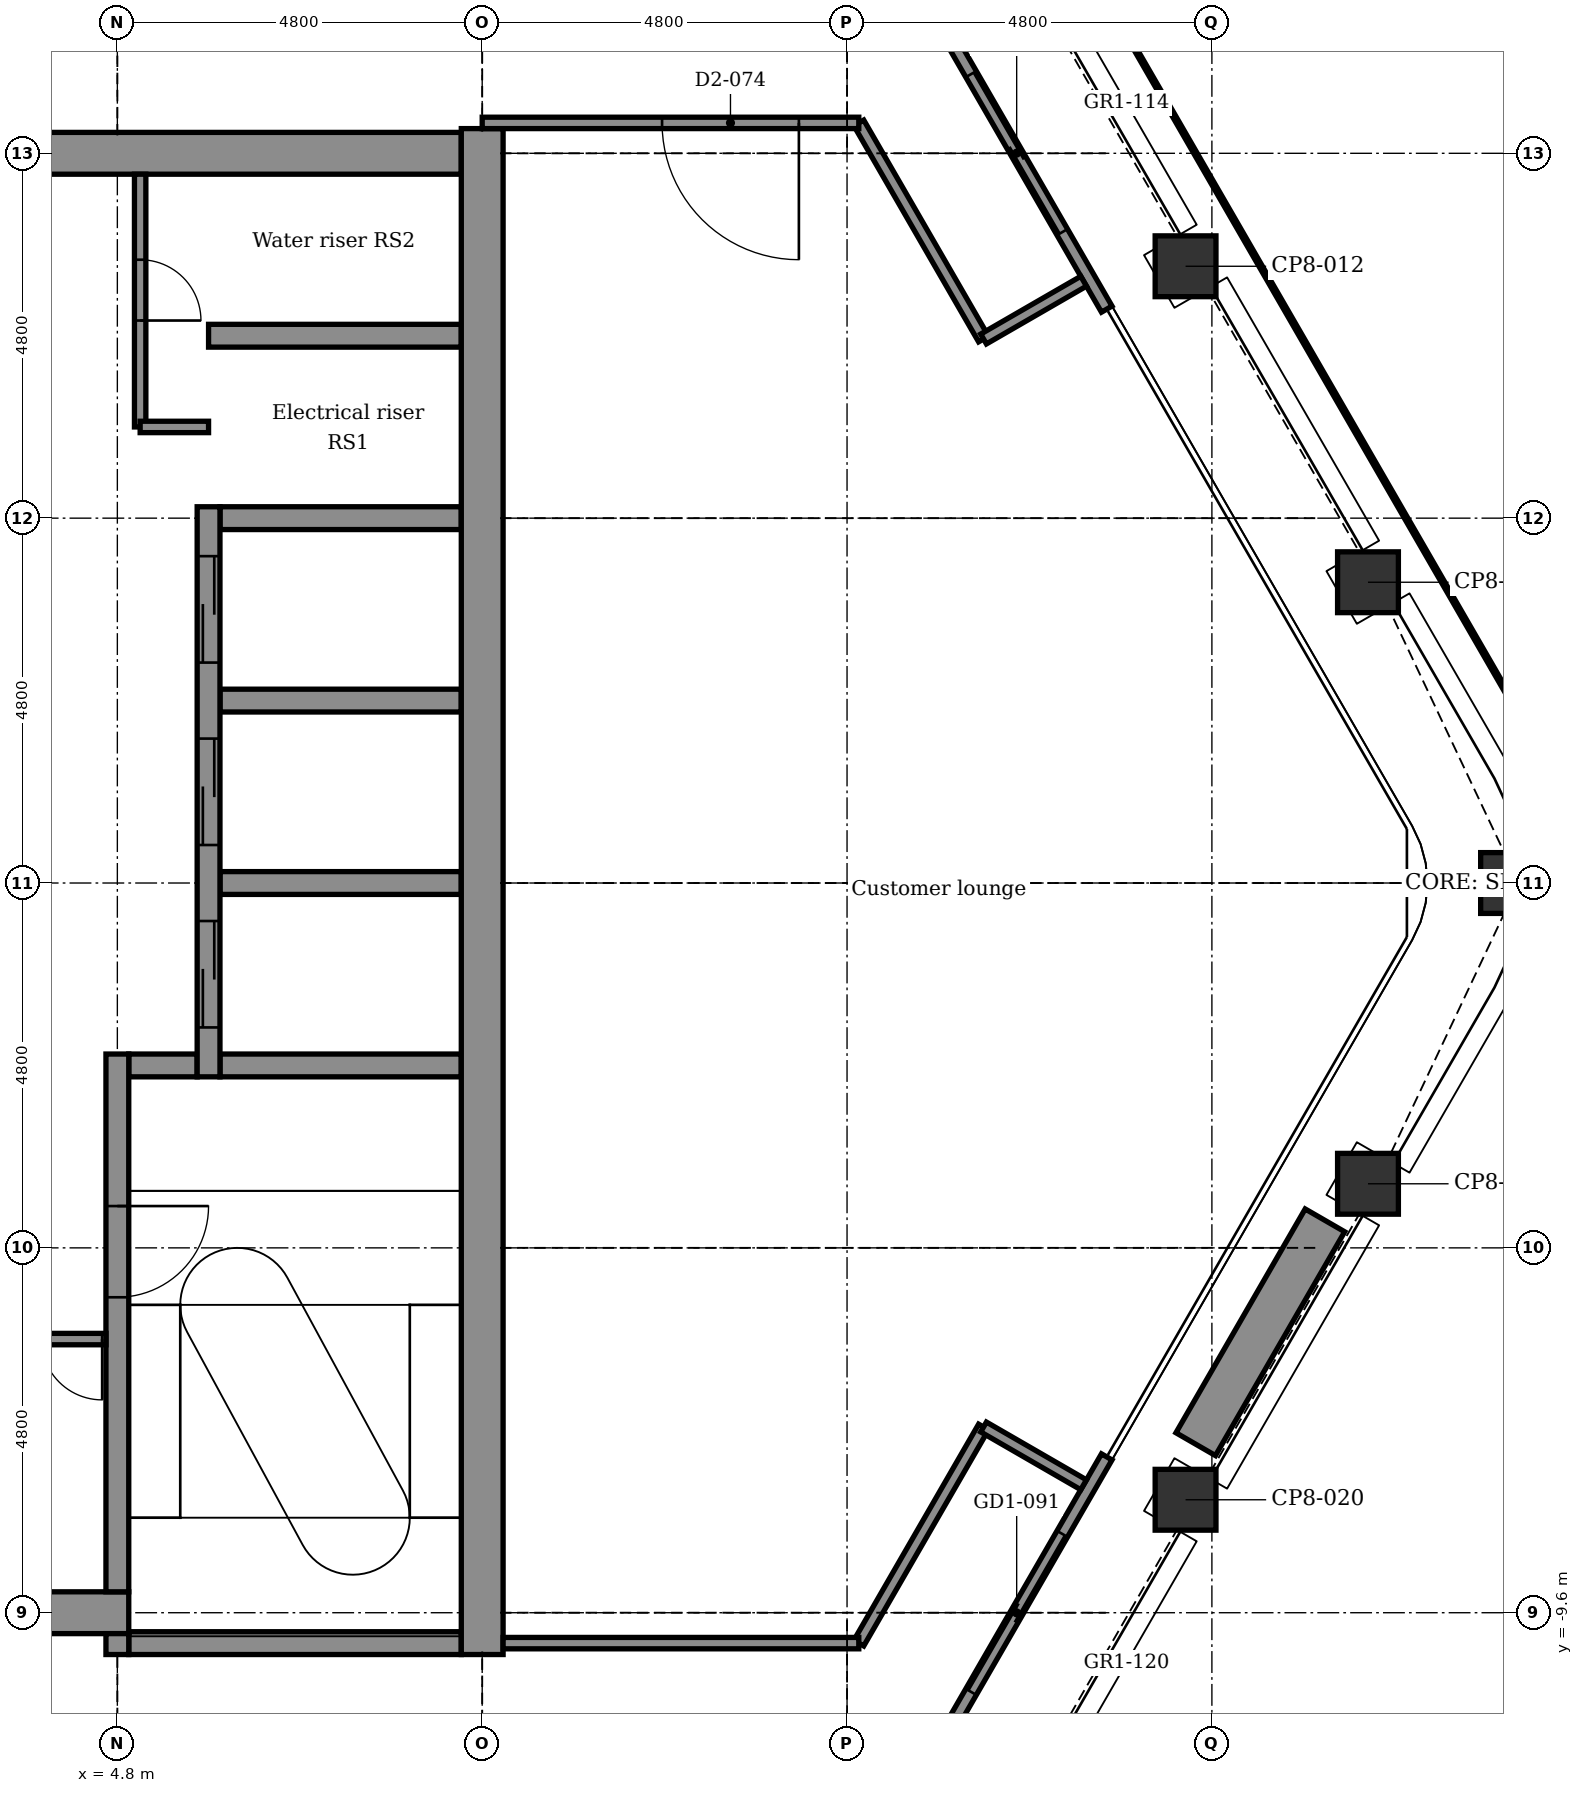
"""IFC4 building model, lengths in metres.
Left out: names, types, materials, properties, quantities, classifications, styles, units other than length and angle.
Written with IfcOpenShell. Run it as: python <this file> out.ifc"""

import sys

from ifc_helpers import new_model, si_unit, direction, frame, frame_2d, origin, origin_2d, place, context, subcontext, project, spatial, rectangle, extrude, element, fill, save


model = new_model("IFC4")
c1 = context("Model", 3, precision=1e-05, world=origin(), true_north=direction((0.0, 1.0)))
c2 = subcontext(c1, "Body", "Model", "MODEL_VIEW")
j1 = project(units=[si_unit("LENGTHUNIT", "METRE"), si_unit("PLANEANGLEUNIT", "RADIAN")], contexts=[c1])
p1 = place(None, origin())
s1 = spatial("IfcSite", under=j1, at=p1, CompositionType="ELEMENT")
p2 = place(p1, origin())
s2 = spatial("IfcBuilding", under=s1, at=p2, CompositionType="ELEMENT")
p3 = place(p2, frame((0.0, 0.0, 269.6)))
s3 = spatial("IfcBuildingStorey", under=s2, at=p3, CompositionType="ELEMENT", Elevation=269.6)
for number, where, z_axis, x_axis in (
    (1, (18.854, 8.114, -0.15), (0.0, 0.0, 1.0), (0.866, 0.5, 0.0)),
    (2, (21.254, 3.957, -0.15), (0.0, 0.0, 1.0), (0.866, 0.5, 0.0)),
    (3, (23.136, 0.0, -0.15), (0.0, 0.0, 1.0), (1.0, 0.0, 0.0)),
    (4, (21.254, -3.957, -0.15), (0.0, 0.0, 1.0), (0.5, 0.866, 0.0)),
    (5, (18.854, -8.114, -0.15), (0.0, 0.0, 1.0), (0.5, 0.866, 0.0)),
):
    element("IfcColumn", number, at=place(p3, frame(where, z_axis=z_axis, x_axis=x_axis)), inside=s3, PredefinedType="COLUMN", context=c2, shape_type="SweptSolid", body=[
        extrude(rectangle(XDim=0.8, YDim=0.8, at=origin_2d()), origin(), (0.0, 0.0, 1.0), 3.9),
    ])
p4 = place(p3, frame((4.95, -10.0, -0.15), z_axis=(0.0, 0.0, 1.0), x_axis=(1.0, 0.0, 0.0)))
e6 = element("IfcWall", 6, at=p4, inside=s3, PredefinedType="STANDARD", context=c2, shape_type="SweptSolid", body=[
    extrude(rectangle(XDim=4.375, YDim=0.3, at=frame_2d((2.188, 0.0))), origin(), (0.0, 0.0, 1.0), 3.9),
])
p5 = place(p3, frame((-5.25, -9.6, -0.15), z_axis=(0.0, 0.0, 1.0), x_axis=(1.0, 0.0, 0.0)))
e7 = element("IfcWall", 7, at=p5, inside=s3, PredefinedType="SHEAR", context=c2, shape_type="SweptSolid", body=[
    extrude(rectangle(XDim=10.2, YDim=0.55, at=frame_2d((5.1, 0.0))), origin(), (0.0, 0.0, 1.0), 3.9),
])
p6 = place(p5, frame((0.6, 0.0, 0.15)))
e8 = element("IfcOpeningElement", 8, at=p6, cuts=e7, PredefinedType="OPENING", context=c2, shape_type="SweptSolid", body=[
    extrude(rectangle(XDim=0.9, YDim=2.1, at=frame_2d((0.45, 1.05))), frame((0.0, 0.285, 0.0), z_axis=(0.0, -1.0, 0.0), x_axis=(1.0, 0.0, 0.0)), (0.0, 0.0, 1.0), 0.57),
])
p7 = place(p3, frame((4.95, -2.4, -0.15), z_axis=(0.0, 0.0, 1.0), x_axis=(1.0, 0.0, 0.0)))
e9 = element("IfcWall", 9, at=p7, inside=s3, PredefinedType="STANDARD", context=c2, shape_type="SweptSolid", body=[
    extrude(rectangle(XDim=0.9, YDim=0.3, at=frame_2d((0.45, 0.0))), origin(), (0.0, 0.0, 1.0), 3.9),
])
for number, where, z_axis, x_axis in (
    (10, (6.15, -2.4, -0.15), (0.0, 0.0, 1.0), (1.0, 0.0, 0.0)),
    (11, (6.15, 0.0, -0.15), (0.0, 0.0, 1.0), (1.0, 0.0, 0.0)),
    (12, (6.15, 2.4, -0.15), (0.0, 0.0, 1.0), (1.0, 0.0, 0.0)),
    (13, (6.15, 4.8, -0.15), (0.0, 0.0, 1.0), (1.0, 0.0, 0.0)),
):
    element("IfcWall", number, at=place(p3, frame(where, z_axis=z_axis, x_axis=x_axis)), inside=s3, PredefinedType="STANDARD", context=c2, shape_type="SweptSolid", body=[
        extrude(rectangle(XDim=3.175, YDim=0.3, at=frame_2d((1.587, 0.0))), origin(), (0.0, 0.0, 1.0), 3.9),
    ])
p8 = place(p3, frame((6.0, 7.2, -0.15), z_axis=(0.0, 0.0, 1.0), x_axis=(1.0, 0.0, 0.0)))
e14 = element("IfcWall", 14, at=p8, inside=s3, PredefinedType="STANDARD", context=c2, shape_type="SweptSolid", body=[
    extrude(rectangle(XDim=3.325, YDim=0.3, at=frame_2d((1.663, 0.0))), origin(), (0.0, 0.0, 1.0), 3.9),
])
p9 = place(p3, frame((-5.25, 9.6, -0.15), z_axis=(0.0, 0.0, 1.0), x_axis=(1.0, 0.0, 0.0)))
e15 = element("IfcWall", 15, at=p9, inside=s3, PredefinedType="SHEAR", context=c2, shape_type="SweptSolid", body=[
    extrude(rectangle(XDim=14.575, YDim=0.55, at=frame_2d((7.288, 0.0))), origin(), (0.0, 0.0, 1.0), 3.9),
])
p10 = place(p9, frame((0.6, 0.0, 0.15)))
e16 = element("IfcOpeningElement", 16, at=p10, cuts=e15, PredefinedType="OPENING", context=c2, shape_type="SweptSolid", body=[
    extrude(rectangle(XDim=0.9, YDim=2.1, at=frame_2d((0.45, 1.05))), frame((0.0, 0.285, 0.0), z_axis=(0.0, -1.0, 0.0), x_axis=(1.0, 0.0, 0.0)), (0.0, 0.0, 1.0), 0.57),
])
p11 = place(p3, frame((4.8, -10.15, -0.15), z_axis=(0.0, 0.0, 1.0), x_axis=(0.0, 1.0, 0.0)))
e17 = element("IfcWall", 17, at=p11, inside=s3, PredefinedType="STANDARD", context=c2, shape_type="SweptSolid", body=[
    extrude(rectangle(XDim=0.275, YDim=0.3, at=frame_2d((0.137, 0.0))), origin(), (0.0, 0.0, 1.0), 3.9),
])
p12 = place(p3, frame((4.8, -9.325, -0.15), z_axis=(0.0, 0.0, 1.0), x_axis=(0.0, 1.0, 0.0)))
e18 = element("IfcWall", 18, at=p12, inside=s3, PredefinedType="STANDARD", context=c2, shape_type="SweptSolid", body=[
    extrude(rectangle(XDim=7.075, YDim=0.3, at=frame_2d((3.538, 0.0))), origin(), (0.0, 0.0, 1.0), 3.9),
])
p13 = place(p12, frame((3.875, 0.0, 0.15)))
e19 = element("IfcOpeningElement", 19, at=p13, cuts=e18, PredefinedType="OPENING", context=c2, shape_type="SweptSolid", body=[
    extrude(rectangle(XDim=1.2, YDim=2.1, at=frame_2d((0.6, 1.05))), frame((0.0, 0.16, 0.0), z_axis=(0.0, -1.0, 0.0), x_axis=(1.0, 0.0, 0.0)), (0.0, 0.0, 1.0), 0.32),
])
p14 = place(p3, frame((6.0, -2.55, -0.15), z_axis=(0.0, 0.0, 1.0), x_axis=(0.0, 1.0, 0.0)))
e20 = element("IfcWall", 20, at=p14, inside=s3, PredefinedType="STANDARD", context=c2, shape_type="SweptSolid", body=[
    extrude(rectangle(XDim=7.5, YDim=0.3, at=frame_2d((3.75, 0.0))), origin(), (0.0, 0.0, 1.0), 3.9),
])
p15 = place(p14, frame((0.65, 0.0, 0.15)))
e21 = element("IfcOpeningElement", 21, at=p15, cuts=e20, PredefinedType="OPENING", context=c2, shape_type="SweptSolid", body=[
    extrude(rectangle(XDim=1.4, YDim=2.1, at=frame_2d((0.7, 1.05))), frame((0.0, 0.16, 0.0), z_axis=(0.0, -1.0, 0.0), x_axis=(1.0, 0.0, 0.0)), (0.0, 0.0, 1.0), 0.32),
])
p16 = place(p14, frame((3.05, 0.0, 0.15)))
e22 = element("IfcOpeningElement", 22, at=p16, cuts=e20, PredefinedType="OPENING", context=c2, shape_type="SweptSolid", body=[
    extrude(rectangle(XDim=1.4, YDim=2.1, at=frame_2d((0.7, 1.05))), frame((0.0, 0.16, 0.0), z_axis=(0.0, -1.0, 0.0), x_axis=(1.0, 0.0, 0.0)), (0.0, 0.0, 1.0), 0.32),
])
p17 = place(p14, frame((5.45, 0.0, 0.15)))
e23 = element("IfcOpeningElement", 23, at=p17, cuts=e20, PredefinedType="OPENING", context=c2, shape_type="SweptSolid", body=[
    extrude(rectangle(XDim=1.4, YDim=2.1, at=frame_2d((0.7, 1.05))), frame((0.0, 0.16, 0.0), z_axis=(0.0, -1.0, 0.0), x_axis=(1.0, 0.0, 0.0)), (0.0, 0.0, 1.0), 0.32),
])
p18 = place(p3, frame((9.6, -10.15, -0.15), z_axis=(0.0, 0.0, 1.0), x_axis=(0.0, 1.0, 0.0)))
e24 = element("IfcWall", 24, at=p18, inside=s3, PredefinedType="SHEAR", context=c2, shape_type="SweptSolid", body=[
    extrude(rectangle(XDim=20.075, YDim=0.55, at=frame_2d((10.038, 0.0))), origin(), (0.0, 0.0, 1.0), 3.9),
])
p19 = place(p3, frame((15.447, 11.655, 0.0), z_axis=(0.0, 0.0, 1.0), x_axis=(0.499978080042, -0.866038058908, 0.0)))
e25 = element("IfcWall", 25, at=p19, inside=s3, PredefinedType="PARTITIONING", context=c2, shape_type="SweptSolid", body=[
    extrude(rectangle(XDim=4.74, YDim=0.16, at=frame_2d((2.37, 0.0))), origin(), (0.0, 0.0, 1.0), 3.75),
])
p20 = place(p19, frame((1.17, 0.0, 0.0)))
e26 = element("IfcOpeningElement", 26, at=p20, cuts=e25, PredefinedType="OPENING", context=c2, shape_type="SweptSolid", body=[
    extrude(rectangle(XDim=2.4, YDim=2.4, at=frame_2d((1.2, 1.2))), frame((0.0, 0.09, 0.0), z_axis=(0.0, -1.0, 0.0), x_axis=(1.0, 0.0, 0.0)), (0.0, 0.0, 1.0), 0.18),
])
p21 = place(p3, frame((17.817, -7.55, 0.0), z_axis=(0.0, 0.0, 1.0), x_axis=(-0.499978080042, -0.866038058908, 0.0)))
e27 = element("IfcWall", 27, at=p21, inside=s3, PredefinedType="PARTITIONING", context=c2, shape_type="SweptSolid", body=[
    extrude(rectangle(XDim=4.74, YDim=0.16, at=frame_2d((2.37, 0.0))), origin(), (0.0, 0.0, 1.0), 3.75),
])
p22 = place(p21, frame((1.17, 0.0, 0.0)))
e28 = element("IfcOpeningElement", 28, at=p22, cuts=e27, PredefinedType="OPENING", context=c2, shape_type="SweptSolid", body=[
    extrude(rectangle(XDim=2.4, YDim=2.4, at=frame_2d((1.2, 1.2))), frame((0.0, 0.09, 0.0), z_axis=(0.0, -1.0, 0.0), x_axis=(1.0, 0.0, 0.0)), (0.0, 0.0, 1.0), 0.18),
])
p23 = place(p3, frame((20.687, -4.438, 0.0), z_axis=(0.0, 0.0, 1.0), x_axis=(-0.500008388397, -0.866020560687, 0.0)))
e29 = element("IfcWall", 29, at=p23, inside=s3, PredefinedType="USERDEFINED", context=c2, shape_type="SweptSolid", body=[
    extrude(rectangle(XDim=3.4, YDim=0.6, at=frame_2d((1.7, 0.0))), origin(), (0.0, 0.0, 1.0), 0.7),
])
p24 = place(p3, frame((5.1, 6.0, 0.0), z_axis=(0.0, 0.0, 1.0), x_axis=(0.0, 1.0, 0.0)))
e30 = element("IfcWall", 30, at=p24, inside=s3, PredefinedType="PARTITIONING", context=c2, shape_type="SweptSolid", body=[
    extrude(rectangle(XDim=3.325, YDim=0.15, at=frame_2d((1.663, 0.0))), origin(), (0.0, 0.0, 1.0), 3.75),
])
p25 = place(p24, frame((1.4, 0.0, 0.0)))
e31 = element("IfcOpeningElement", 31, at=p25, cuts=e30, PredefinedType="OPENING", context=c2, shape_type="SweptSolid", body=[
    extrude(rectangle(XDim=0.8, YDim=2.1, at=frame_2d((0.4, 1.05))), frame((0.0, 0.085, 0.0), z_axis=(0.0, -1.0, 0.0), x_axis=(1.0, 0.0, 0.0)), (0.0, 0.0, 1.0), 0.17),
])
for number, where, z_axis, x_axis in (
    (32, (14.555, 10.0, 0.0), (0.0, 0.0, 1.0), (0.5, -0.866, 0.0)),
    (33, (14.555, -10.0, 0.0), (0.0, 0.0, 1.0), (0.5, 0.866, 0.0)),
):
    element("IfcWall", number, at=place(p3, frame(where, z_axis=z_axis, x_axis=x_axis)), inside=s3, PredefinedType="PARTITIONING", context=c2, shape_type="SweptSolid", body=[
        extrude(rectangle(XDim=3.283, YDim=0.15, at=frame_2d((1.642, 0.0))), origin(), (0.0, 0.0, 1.0), 3.75),
    ])
for number, where, z_axis, x_axis in (
    (34, (16.196, -7.157, 0.0), (0.0, 0.0, 1.0), (0.866, -0.5, 0.0)),
    (35, (16.196, 7.157, 0.0), (0.0, 0.0, 1.0), (0.866, 0.5, 0.0)),
):
    element("IfcWall", number, at=place(p3, frame(where, z_axis=z_axis, x_axis=x_axis)), inside=s3, PredefinedType="PARTITIONING", context=c2, shape_type="SweptSolid", body=[
        extrude(rectangle(XDim=1.52, YDim=0.15, at=frame_2d((0.76, 0.0))), origin(), (0.0, 0.0, 1.0), 3.75),
    ])
p26 = place(p3, frame((9.875, -10.0, 0.0), z_axis=(0.0, 0.0, 1.0), x_axis=(1.0, 0.0, 0.0)))
e36 = element("IfcWall", 36, at=p26, inside=s3, PredefinedType="PARTITIONING", context=c2, shape_type="SweptSolid", body=[
    extrude(rectangle(XDim=4.68, YDim=0.15, at=frame_2d((2.34, 0.0))), origin(), (0.0, 0.0, 1.0), 3.75),
])
p27 = place(p3, frame((3.75, -6.0, 0.0), z_axis=(0.0, 0.0, 1.0), x_axis=(1.0, 0.0, 0.0)))
e37 = element("IfcWall", 37, at=p27, inside=s3, PredefinedType="PARTITIONING", context=c2, shape_type="SweptSolid", body=[
    extrude(rectangle(XDim=0.9, YDim=0.15, at=frame_2d((0.45, 0.0))), origin(), (0.0, 0.0, 1.0), 3.75),
])
p28 = place(p27, frame((0.05, 0.0, 0.0)))
e38 = element("IfcOpeningElement", 38, at=p28, cuts=e37, PredefinedType="OPENING", context=c2, shape_type="SweptSolid", body=[
    extrude(rectangle(XDim=0.8, YDim=2.1, at=frame_2d((0.4, 1.05))), frame((0.0, 0.085, 0.0), z_axis=(0.0, -1.0, 0.0), x_axis=(1.0, 0.0, 0.0)), (0.0, 0.0, 1.0), 0.17),
])
p29 = place(p3, frame((5.1, 6.0, 0.0), z_axis=(0.0, 0.0, 1.0), x_axis=(1.0, 0.0, 0.0)))
e39 = element("IfcWall", 39, at=p29, inside=s3, PredefinedType="PARTITIONING", context=c2, shape_type="SweptSolid", body=[
    extrude(rectangle(XDim=0.9, YDim=0.15, at=frame_2d((0.45, 0.0))), origin(), (0.0, 0.0, 1.0), 3.75),
])
p30 = place(p3, frame((9.6, 10.0, 0.0), z_axis=(0.0, 0.0, 1.0), x_axis=(1.0, 0.0, 0.0)))
e40 = element("IfcWall", 40, at=p30, inside=s3, PredefinedType="PARTITIONING", context=c2, shape_type="SweptSolid", body=[
    extrude(rectangle(XDim=4.955, YDim=0.15, at=frame_2d((2.477, 0.0))), origin(), (0.0, 0.0, 1.0), 3.75),
])
p31 = place(p30, frame((2.366, 0.0, 0.0)))
e41 = element("IfcOpeningElement", 41, at=p31, cuts=e40, PredefinedType="OPENING", context=c2, shape_type="SweptSolid", body=[
    extrude(rectangle(XDim=1.8, YDim=2.1, at=frame_2d((0.9, 1.05))), frame((0.0, 0.085, 0.0), z_axis=(0.0, -1.0, 0.0), x_axis=(1.0, 0.0, 0.0)), (0.0, 0.0, 1.0), 0.17),
])
p32 = place(p20, origin())
e42 = element("IfcDoor", 42, at=p32, inside=s3, OperationType="DOUBLE_DOOR_SLIDING", PredefinedType="DOOR", context=c2, shape_type="SweptSolid", body=[
    extrude(rectangle(XDim=2.4, YDim=2.4, at=frame_2d((1.2, 1.2))), frame((0.0, 0.025, 0.0), z_axis=(0.0, -1.0, 0.0), x_axis=(1.0, 0.0, 0.0)), (0.0, 0.0, 1.0), 0.05),
])
fill(e26, e42)
p33 = place(p22, origin())
e43 = element("IfcDoor", 43, at=p33, inside=s3, OperationType="DOUBLE_DOOR_SLIDING", PredefinedType="DOOR", context=c2, shape_type="SweptSolid", body=[
    extrude(rectangle(XDim=2.4, YDim=2.4, at=frame_2d((1.2, 1.2))), frame((0.0, 0.025, 0.0), z_axis=(0.0, -1.0, 0.0), x_axis=(1.0, 0.0, 0.0)), (0.0, 0.0, 1.0), 0.05),
])
fill(e28, e43)
p34 = place(p25, frame((0.8, 0.0, 0.0), z_axis=(0.0, 0.0, 1.0), x_axis=(-1.0, 0.0, 0.0)))
e44 = element("IfcDoor", 44, at=p34, inside=s3, OperationType="SINGLE_SWING_LEFT", PredefinedType="DOOR", context=c2, shape_type="SweptSolid", body=[
    extrude(rectangle(XDim=0.8, YDim=2.1, at=frame_2d((0.4, 1.05))), frame((0.0, 0.025, 0.0), z_axis=(0.0, -1.0, 0.0), x_axis=(1.0, 0.0, 0.0)), (0.0, 0.0, 1.0), 0.05),
])
fill(e31, e44)
p35 = place(p28, frame((0.8, 0.0, 0.0), z_axis=(0.0, 0.0, 1.0), x_axis=(-1.0, 0.0, 0.0)))
e45 = element("IfcDoor", 45, at=p35, inside=s3, OperationType="SINGLE_SWING_RIGHT", PredefinedType="DOOR", context=c2, shape_type="SweptSolid", body=[
    extrude(rectangle(XDim=0.8, YDim=2.1, at=frame_2d((0.4, 1.05))), frame((0.0, 0.025, 0.0), z_axis=(0.0, -1.0, 0.0), x_axis=(1.0, 0.0, 0.0)), (0.0, 0.0, 1.0), 0.05),
])
fill(e38, e45)
p36 = place(p31, frame((1.8, 0.0, 0.0), z_axis=(0.0, 0.0, 1.0), x_axis=(-1.0, 0.0, 0.0)))
e46 = element("IfcDoor", 46, at=p36, inside=s3, OperationType="SINGLE_SWING_RIGHT", PredefinedType="DOOR", context=c2, shape_type="SweptSolid", body=[
    extrude(rectangle(XDim=1.8, YDim=2.1, at=frame_2d((0.9, 1.05))), frame((0.0, 0.025, 0.0), z_axis=(0.0, -1.0, 0.0), x_axis=(1.0, 0.0, 0.0)), (0.0, 0.0, 1.0), 0.05),
])
fill(e41, e46)
p37 = place(p15, origin())
e47 = element("IfcDoor", 47, at=p37, inside=s3, OperationType="DOUBLE_DOOR_SLIDING", PredefinedType="DOOR", context=c2, shape_type="SweptSolid", body=[
    extrude(rectangle(XDim=1.4, YDim=2.1, at=frame_2d((0.7, 1.05))), frame((0.0, 0.025, 0.0), z_axis=(0.0, -1.0, 0.0), x_axis=(1.0, 0.0, 0.0)), (0.0, 0.0, 1.0), 0.05),
])
fill(e21, e47)
p38 = place(p16, origin())
e48 = element("IfcDoor", 48, at=p38, inside=s3, OperationType="DOUBLE_DOOR_SLIDING", PredefinedType="DOOR", context=c2, shape_type="SweptSolid", body=[
    extrude(rectangle(XDim=1.4, YDim=2.1, at=frame_2d((0.7, 1.05))), frame((0.0, 0.025, 0.0), z_axis=(0.0, -1.0, 0.0), x_axis=(1.0, 0.0, 0.0)), (0.0, 0.0, 1.0), 0.05),
])
fill(e22, e48)
p39 = place(p17, origin())
e49 = element("IfcDoor", 49, at=p39, inside=s3, OperationType="DOUBLE_DOOR_SLIDING", PredefinedType="DOOR", context=c2, shape_type="SweptSolid", body=[
    extrude(rectangle(XDim=1.4, YDim=2.1, at=frame_2d((0.7, 1.05))), frame((0.0, 0.025, 0.0), z_axis=(0.0, -1.0, 0.0), x_axis=(1.0, 0.0, 0.0)), (0.0, 0.0, 1.0), 0.05),
])
fill(e23, e49)
p40 = place(p13, frame((1.2, 0.0, 0.0), z_axis=(0.0, 0.0, 1.0), x_axis=(-1.0, 0.0, 0.0)))
e50 = element("IfcDoor", 50, at=p40, inside=s3, OperationType="SINGLE_SWING_RIGHT", PredefinedType="DOOR", context=c2, shape_type="SweptSolid", body=[
    extrude(rectangle(XDim=1.2, YDim=2.1, at=frame_2d((0.6, 1.05))), frame((0.0, 0.025, 0.0), z_axis=(0.0, -1.0, 0.0), x_axis=(1.0, 0.0, 0.0)), (0.0, 0.0, 1.0), 0.05),
])
fill(e19, e50)
save(model, sys.argv[1])
